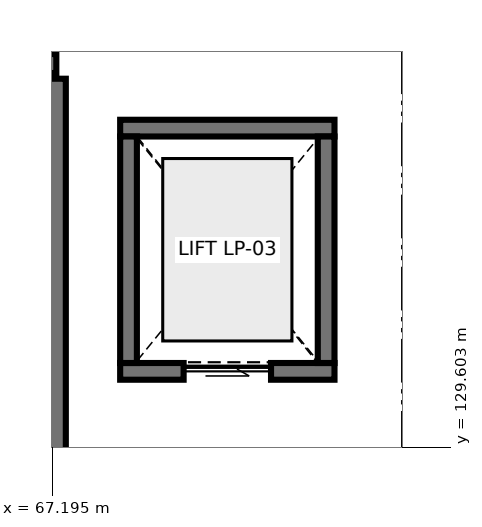
"""IFC4 building model, lengths in metres.
Left out: names, types, materials, properties, quantities, classifications, styles, units other than length and angle.
Written with IfcOpenShell. Run it as: python <this file> out.ifc"""

import sys

from ifc_helpers import new_model, si_unit, direction, frame, frame_2d, origin, place, context, subcontext, project, spatial, rectangle, extrude, element, fill, save


model = new_model("IFC4")
c1 = context("Model", 3, precision=1e-05, world=origin(), true_north=direction((0.0, 1.0)))
c2 = subcontext(c1, "Body", "Model", "MODEL_VIEW")
j1 = project(units=[si_unit("LENGTHUNIT", "METRE"), si_unit("PLANEANGLEUNIT", "RADIAN")], contexts=[c1])
p1 = place(None, origin())
s1 = spatial("IfcSite", under=j1, at=p1, CompositionType="ELEMENT")
p2 = place(p1, origin())
s2 = spatial("IfcBuilding", under=s1, at=p2, CompositionType="ELEMENT")
p3 = place(p2, origin())
s3 = spatial("IfcBuildingStorey", under=s2, at=p3, CompositionType="ELEMENT", Elevation=0.0)
p4 = place(p3, frame((58.95, 134.65, 0.0), z_axis=(0.0, 0.0, 1.0), x_axis=(1.0, 0.0, 0.0)))
e1 = element("IfcWall", 1, at=p4, inside=s3, PredefinedType="SHEAR", context=c2, shape_type="SweptSolid", body=[
    extrude(rectangle(XDim=8.3, YDim=0.25, at=frame_2d((4.15, 0.0))), origin(), (0.0, 0.0, 1.0), 5.12),
])
p5 = place(p3, frame((67.25, 134.45, 0.0), z_axis=(0.0, 0.0, 1.0), x_axis=(0.0, -1.0, 0.0)))
e2 = element("IfcWall", 2, at=p5, inside=s3, PredefinedType="SHEAR", context=c2, shape_type="SweptSolid", body=[
    extrude(rectangle(XDim=5.3, YDim=0.25, at=frame_2d((2.65, 0.0))), origin(), (0.0, 0.0, 1.0), 5.12),
])
p6 = place(p3, frame((68.09, 130.6, 0.0), z_axis=(0.0, 0.0, 1.0), x_axis=(1.0, 0.0, 0.0)))
e3 = element("IfcWall", 3, at=p6, inside=s3, PredefinedType="SHEAR", context=c2, shape_type="SweptSolid", body=[
    extrude(rectangle(XDim=2.82, YDim=0.22, at=frame_2d((1.41, 0.0))), origin(), (0.0, 0.0, 1.0), 5.12),
])
p7 = place(p6, frame((0.835, 0.0, 0.0)))
e4 = element("IfcOpeningElement", 4, at=p7, cuts=e3, PredefinedType="OPENING", context=c2, shape_type="SweptSolid", body=[
    extrude(rectangle(XDim=1.15, YDim=2.2, at=frame_2d((0.575, 1.1))), frame((0.0, 0.12, 0.0), z_axis=(0.0, -1.0, 0.0), x_axis=(1.0, 0.0, 0.0)), (0.0, 0.0, 1.0), 0.24),
])
p8 = place(p3, frame((68.09, 133.8, 0.0), z_axis=(0.0, 0.0, 1.0), x_axis=(1.0, 0.0, 0.0)))
e5 = element("IfcWall", 5, at=p8, inside=s3, PredefinedType="SHEAR", context=c2, shape_type="SweptSolid", body=[
    extrude(rectangle(XDim=2.82, YDim=0.22, at=frame_2d((1.41, 0.0))), origin(), (0.0, 0.0, 1.0), 5.12),
])
for number, where, z_axis, x_axis in (
    (6, (68.2, 130.71, 0.0), (0.0, 0.0, 1.0), (0.0, 1.0, 0.0)),
    (7, (70.8, 130.71, 0.0), (0.0, 0.0, 1.0), (0.0, 1.0, 0.0)),
):
    element("IfcWall", number, at=place(p3, frame(where, z_axis=z_axis, x_axis=x_axis)), inside=s3, PredefinedType="SHEAR", context=c2, shape_type="SweptSolid", body=[
        extrude(rectangle(XDim=2.98, YDim=0.22, at=frame_2d((1.49, 0.0))), origin(), (0.0, 0.0, 1.0), 5.12),
    ])
p9 = place(p7, origin())
e8 = element("IfcDoor", 8, at=p9, inside=s3, OperationType="SLIDING_TO_LEFT", PredefinedType="DOOR", context=c2, shape_type="SweptSolid", body=[
    extrude(rectangle(XDim=1.15, YDim=2.2, at=frame_2d((0.575, 1.1))), frame((0.0, 0.025, 0.0), z_axis=(0.0, -1.0, 0.0), x_axis=(1.0, 0.0, 0.0)), (0.0, 0.0, 1.0), 0.05),
])
fill(e4, e8)
save(model, sys.argv[1])
